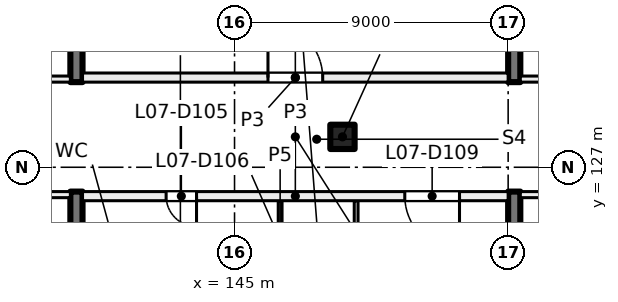
"""IFC4 building model, lengths in metres.
Left out: names, types, materials, properties, quantities, classifications, styles, units other than length and angle.
Written with IfcOpenShell. Run it as: python <this file> out.ifc"""

import sys

from ifc_helpers import new_model, si_unit, direction, frame, frame_2d, origin, origin_2d, place, context, subcontext, project, spatial, rectangle, extrude, element, fill, save


model = new_model("IFC4")
c1 = context("Model", 3, precision=1e-05, world=origin(), true_north=direction((0.0, 1.0)))
c2 = subcontext(c1, "Body", "Model", "MODEL_VIEW")
j1 = project(units=[si_unit("LENGTHUNIT", "METRE"), si_unit("PLANEANGLEUNIT", "RADIAN")], contexts=[c1])
p1 = place(None, origin())
s1 = spatial("IfcSite", under=j1, at=p1, CompositionType="ELEMENT")
p2 = place(p1, origin())
s2 = spatial("IfcBuilding", under=s1, at=p2, CompositionType="ELEMENT")
p3 = place(p2, frame((0.0, 0.0, 35.5)))
s3 = spatial("IfcBuildingStorey", under=s2, at=p3, CompositionType="ELEMENT", Elevation=35.5)
p4 = place(p3, frame((148.55, 128.0, 0.0), z_axis=(0.0, 0.0, 1.0), x_axis=(1.0, 0.0, 0.0)))
e1 = element("IfcColumn", 1, at=p4, inside=s3, PredefinedType="COLUMN", context=c2, shape_type="SweptSolid", body=[
    extrude(rectangle(XDim=0.8, YDim=0.8, at=origin_2d()), origin(), (0.0, 0.0, 1.0), 4.0),
])
for number, where, z_axis, x_axis in (
    (2, (139.8, 117.6, 0.0), (0.0, 0.0, 1.0), (0.0, 1.0, 0.0)),
    (3, (139.8, 129.8, 0.0), (0.0, 0.0, 1.0), (0.0, 1.0, 0.0)),
    (4, (154.2, 138.4, 0.0), (0.0, 0.0, 1.0), (0.0, -1.0, 0.0)),
    (5, (154.2, 126.2, 0.0), (0.0, 0.0, 1.0), (0.0, -1.0, 0.0)),
):
    element("IfcWall", number, at=place(p3, frame(where, z_axis=z_axis, x_axis=x_axis)), inside=s3, PredefinedType="SHEAR", context=c2, shape_type="SweptSolid", body=[
        extrude(rectangle(XDim=8.6, YDim=0.4, at=frame_2d((4.3, 0.0))), origin(), (0.0, 0.0, 1.0), 4.0),
    ])
p5 = place(p3, frame((135.0, 129.9, 0.0), z_axis=(0.0, 0.0, 1.0), x_axis=(1.0, 0.0, 0.0)))
e6 = element("IfcWall", 6, at=p5, inside=s3, PredefinedType="PARTITIONING", context=c2, shape_type="SweptSolid", body=[
    extrude(rectangle(XDim=4.6, YDim=0.2, at=frame_2d((2.3, 0.0))), origin(), (0.0, 0.0, 1.0), 3.625),
])
p6 = place(p5, frame((1.7, 0.0, 0.0)))
e7 = element("IfcOpeningElement", 7, at=p6, cuts=e6, PredefinedType="OPENING", context=c2, shape_type="SweptSolid", body=[
    extrude(rectangle(XDim=1.2, YDim=2.1, at=frame_2d((0.6, 1.05))), frame((0.0, 0.11, 0.0), z_axis=(0.0, -1.0, 0.0), x_axis=(1.0, 0.0, 0.0)), (0.0, 0.0, 1.0), 0.22),
])
p7 = place(p3, frame((139.6, 126.1, 0.0), z_axis=(0.0, 0.0, 1.0), x_axis=(-1.0, 0.0, 0.0)))
e8 = element("IfcWall", 8, at=p7, inside=s3, PredefinedType="PARTITIONING", context=c2, shape_type="SweptSolid", body=[
    extrude(rectangle(XDim=4.6, YDim=0.2, at=frame_2d((2.3, 0.0))), origin(), (0.0, 0.0, 1.0), 3.625),
])
p8 = place(p7, frame((1.7, 0.0, 0.0)))
e9 = element("IfcOpeningElement", 9, at=p8, cuts=e8, PredefinedType="OPENING", context=c2, shape_type="SweptSolid", body=[
    extrude(rectangle(XDim=1.2, YDim=2.1, at=frame_2d((0.6, 1.05))), frame((0.0, 0.11, 0.0), z_axis=(0.0, -1.0, 0.0), x_axis=(1.0, 0.0, 0.0)), (0.0, 0.0, 1.0), 0.22),
])
p9 = place(p3, frame((163.8, 126.1, 0.0), z_axis=(0.0, 0.0, 1.0), x_axis=(-1.0, 0.0, 0.0)))
e10 = element("IfcWall", 10, at=p9, inside=s3, PredefinedType="PARTITIONING", context=c2, shape_type="SweptSolid", body=[
    extrude(rectangle(XDim=9.4, YDim=0.2, at=frame_2d((4.7, 0.0))), origin(), (0.0, 0.0, 1.0), 3.625),
])
p10 = place(p9, frame((4.1, 0.0, 0.0)))
e11 = element("IfcOpeningElement", 11, at=p10, cuts=e10, PredefinedType="OPENING", context=c2, shape_type="SweptSolid", body=[
    extrude(rectangle(XDim=1.2, YDim=2.1, at=frame_2d((0.6, 1.05))), frame((0.0, 0.11, 0.0), z_axis=(0.0, -1.0, 0.0), x_axis=(1.0, 0.0, 0.0)), (0.0, 0.0, 1.0), 0.22),
])
p11 = place(p3, frame((154.4, 129.9, 0.0), z_axis=(0.0, 0.0, 1.0), x_axis=(1.0, 0.0, 0.0)))
e12 = element("IfcWall", 12, at=p11, inside=s3, PredefinedType="PARTITIONING", context=c2, shape_type="SweptSolid", body=[
    extrude(rectangle(XDim=9.4, YDim=0.2, at=frame_2d((4.7, 0.0))), origin(), (0.0, 0.0, 1.0), 3.625),
])
p12 = place(p11, frame((4.1, 0.0, 0.0)))
e13 = element("IfcOpeningElement", 13, at=p12, cuts=e12, PredefinedType="OPENING", context=c2, shape_type="SweptSolid", body=[
    extrude(rectangle(XDim=1.2, YDim=2.1, at=frame_2d((0.6, 1.05))), frame((0.0, 0.11, 0.0), z_axis=(0.0, -1.0, 0.0), x_axis=(1.0, 0.0, 0.0)), (0.0, 0.0, 1.0), 0.22),
])
p13 = place(p3, frame((140.0, 129.95, 0.0), z_axis=(0.0, 0.0, 1.0), x_axis=(1.0, 0.0, 0.0)))
e14 = element("IfcWall", 14, at=p13, inside=s3, PredefinedType="PARTITIONING", context=c2, shape_type="SweptSolid", body=[
    extrude(rectangle(XDim=14.0, YDim=0.3, at=frame_2d((7.0, 0.0))), origin(), (0.0, 0.0, 1.0), 3.625),
])
p14 = place(p13, frame((6.1, 0.0, 0.0)))
e15 = element("IfcOpeningElement", 15, at=p14, cuts=e14, PredefinedType="OPENING", context=c2, shape_type="SweptSolid", body=[
    extrude(rectangle(XDim=1.8, YDim=2.1, at=frame_2d((0.9, 1.05))), frame((0.0, 0.16, 0.0), z_axis=(0.0, -1.0, 0.0), x_axis=(1.0, 0.0, 0.0)), (0.0, 0.0, 1.0), 0.32),
])
p15 = place(p3, frame((146.5, 125.9, 0.0), z_axis=(0.0, 0.0, 1.0), x_axis=(0.0, -1.0, 0.0)))
e16 = element("IfcWall", 16, at=p15, inside=s3, PredefinedType="PARTITIONING", context=c2, shape_type="SweptSolid", body=[
    extrude(rectangle(XDim=2.588, YDim=0.125, at=frame_2d((1.294, 0.0))), origin(), (0.0, 0.0, 1.0), 3.625),
])
p16 = place(p15, frame((0.794, 0.0, 0.0)))
e17 = element("IfcOpeningElement", 17, at=p16, cuts=e16, PredefinedType="OPENING", context=c2, shape_type="SweptSolid", body=[
    extrude(rectangle(XDim=1.0, YDim=2.1, at=frame_2d((0.5, 1.05))), frame((0.0, 0.073, 0.0), z_axis=(0.0, -1.0, 0.0), x_axis=(1.0, 0.0, 0.0)), (0.0, 0.0, 1.0), 0.145),
])
p17 = place(p3, frame((149.0, 116.988, 0.0), z_axis=(0.0, 0.0, 1.0), x_axis=(0.0, 1.0, 0.0)))
e18 = element("IfcWall", 18, at=p17, inside=s3, PredefinedType="PARTITIONING", context=c2, shape_type="SweptSolid", body=[
    extrude(rectangle(XDim=8.912, YDim=0.125, at=frame_2d((4.456, 0.0))), origin(), (0.0, 0.0, 1.0), 3.625),
])
p18 = place(p3, frame((154.0, 126.05, 0.0), z_axis=(0.0, 0.0, 1.0), x_axis=(-1.0, 0.0, 0.0)))
e19 = element("IfcWall", 19, at=p18, inside=s3, PredefinedType="PARTITIONING", context=c2, shape_type="SweptSolid", body=[
    extrude(rectangle(XDim=14.0, YDim=0.3, at=frame_2d((7.0, 0.0))), origin(), (0.0, 0.0, 1.0), 3.625),
])
p19 = place(p18, frame((10.25, 0.0, 0.0)))
e20 = element("IfcOpeningElement", 20, at=p19, cuts=e19, PredefinedType="OPENING", context=c2, shape_type="SweptSolid", body=[
    extrude(rectangle(XDim=1.0, YDim=2.1, at=frame_2d((0.5, 1.05))), frame((0.0, 0.16, 0.0), z_axis=(0.0, -1.0, 0.0), x_axis=(1.0, 0.0, 0.0)), (0.0, 0.0, 1.0), 0.32),
])
p20 = place(p18, frame((1.6, 0.0, 0.0)))
e21 = element("IfcOpeningElement", 21, at=p20, cuts=e19, PredefinedType="OPENING", context=c2, shape_type="SweptSolid", body=[
    extrude(rectangle(XDim=1.8, YDim=2.1, at=frame_2d((0.9, 1.05))), frame((0.0, 0.16, 0.0), z_axis=(0.0, -1.0, 0.0), x_axis=(1.0, 0.0, 0.0)), (0.0, 0.0, 1.0), 0.32),
])
p21 = place(p14, origin())
e22 = element("IfcDoor", 22, at=p21, inside=s3, OperationType="DOUBLE_DOOR_SINGLE_SWING", PredefinedType="DOOR", context=c2, shape_type="SweptSolid", body=[
    extrude(rectangle(XDim=1.8, YDim=2.1, at=frame_2d((0.9, 1.05))), frame((0.0, 0.025, 0.0), z_axis=(0.0, -1.0, 0.0), x_axis=(1.0, 0.0, 0.0)), (0.0, 0.0, 1.0), 0.05),
])
fill(e15, e22)
p22 = place(p19, origin())
e23 = element("IfcDoor", 23, at=p22, inside=s3, OperationType="SINGLE_SWING_RIGHT", PredefinedType="DOOR", context=c2, shape_type="SweptSolid", body=[
    extrude(rectangle(XDim=1.0, YDim=2.1, at=frame_2d((0.5, 1.05))), frame((0.0, 0.025, 0.0), z_axis=(0.0, -1.0, 0.0), x_axis=(1.0, 0.0, 0.0)), (0.0, 0.0, 1.0), 0.05),
])
fill(e20, e23)
p23 = place(p20, origin())
e24 = element("IfcDoor", 24, at=p23, inside=s3, OperationType="DOUBLE_DOOR_SINGLE_SWING", PredefinedType="DOOR", context=c2, shape_type="SweptSolid", body=[
    extrude(rectangle(XDim=1.8, YDim=2.1, at=frame_2d((0.9, 1.05))), frame((0.0, 0.025, 0.0), z_axis=(0.0, -1.0, 0.0), x_axis=(1.0, 0.0, 0.0)), (0.0, 0.0, 1.0), 0.05),
])
fill(e21, e24)
save(model, sys.argv[1])
